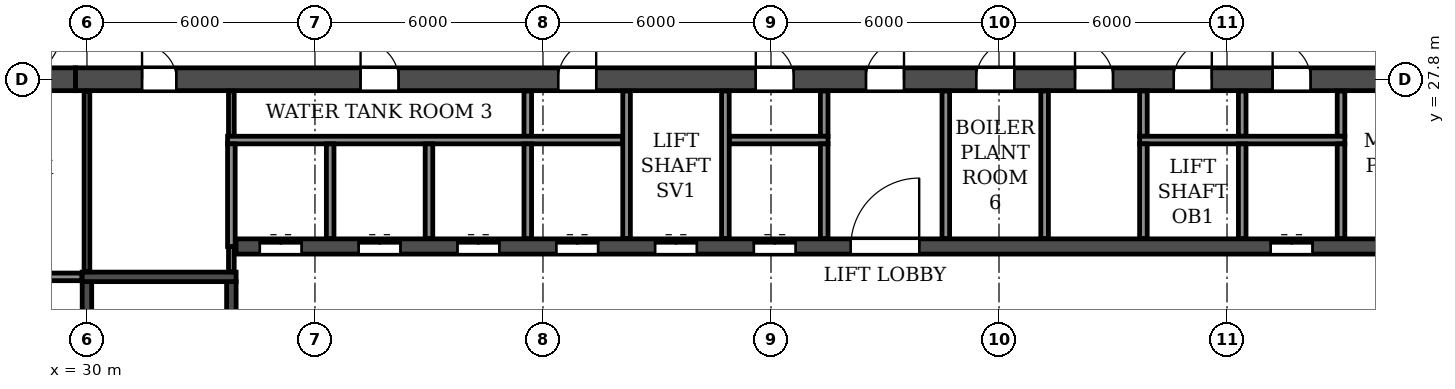
"""IFC4 building model, lengths in metres.
Left out: names, types, materials, properties, quantities, classifications, styles, units other than length and angle.
Written with IfcOpenShell. Run it as: python <this file> out.ifc"""

import sys

from ifc_helpers import new_model, si_unit, direction, frame, frame_2d, origin, place, context, subcontext, project, spatial, rectangle, extrude, element, fill, save


model = new_model("IFC4")
c1 = context("Model", 3, precision=1e-05, world=origin(), true_north=direction((0.0, 1.0)))
c2 = subcontext(c1, "Body", "Model", "MODEL_VIEW")
j1 = project(units=[si_unit("LENGTHUNIT", "METRE"), si_unit("PLANEANGLEUNIT", "RADIAN")], contexts=[c1])
p1 = place(None, origin())
s1 = spatial("IfcSite", under=j1, at=p1, CompositionType="ELEMENT")
p2 = place(p1, origin())
s2 = spatial("IfcBuilding", under=s1, at=p2, CompositionType="ELEMENT")
p3 = place(p2, frame((0.0, 0.0, 214.8)))
s3 = spatial("IfcBuildingStorey", under=s2, at=p3, CompositionType="ELEMENT", Elevation=214.8)
p4 = place(p3, frame((24.9, 27.8, 0.0), z_axis=(0.0, 0.0, 1.0), x_axis=(1.0, 0.0, 0.0)))
e1 = element("IfcWall", 1, at=p4, inside=s3, PredefinedType="SHEAR", context=c2, shape_type="SweptSolid", body=[
    extrude(rectangle(XDim=4.8, YDim=0.6, at=frame_2d((2.4, 0.0))), origin(), (0.0, 0.0, 1.0), 6.38),
])
p5 = place(p4, frame((1.9, 0.0, 0.0)))
e2 = element("IfcOpeningElement", 2, at=p5, cuts=e1, PredefinedType="OPENING", context=c2, shape_type="SweptSolid", body=[
    extrude(rectangle(XDim=1.0, YDim=2.1, at=frame_2d((0.5, 1.05))), frame((0.0, 0.31, 0.0), z_axis=(0.0, -1.0, 0.0), x_axis=(1.0, 0.0, 0.0)), (0.0, 0.0, 1.0), 0.62),
])
p6 = place(p3, frame((29.7, 27.8, 0.0), z_axis=(0.0, 0.0, 1.0), x_axis=(1.0, 0.0, 0.0)))
e3 = element("IfcWall", 3, at=p6, inside=s3, PredefinedType="SOLIDWALL", context=c2, shape_type="SweptSolid", body=[
    extrude(rectangle(XDim=42.6, YDim=0.6, at=frame_2d((21.3, 0.0))), origin(), (0.0, 0.0, 1.0), 6.38),
])
p7 = place(p6, frame((1.75, 0.0, 0.0)))
e4 = element("IfcOpeningElement", 4, at=p7, cuts=e3, PredefinedType="OPENING", context=c2, shape_type="SweptSolid", body=[
    extrude(rectangle(XDim=0.9, YDim=2.1, at=frame_2d((0.45, 1.05))), frame((0.0, 0.31, 0.0), z_axis=(0.0, -1.0, 0.0), x_axis=(1.0, 0.0, 0.0)), (0.0, 0.0, 1.0), 0.62),
])
p8 = place(p6, frame((7.5, 0.0, 0.0)))
e5 = element("IfcOpeningElement", 5, at=p8, cuts=e3, PredefinedType="OPENING", context=c2, shape_type="SweptSolid", body=[
    extrude(rectangle(XDim=1.0, YDim=2.1, at=frame_2d((0.5, 1.05))), frame((0.0, 0.31, 0.0), z_axis=(0.0, -1.0, 0.0), x_axis=(1.0, 0.0, 0.0)), (0.0, 0.0, 1.0), 0.62),
])
p9 = place(p6, frame((12.7, 0.0, 0.0)))
e6 = element("IfcOpeningElement", 6, at=p9, cuts=e3, PredefinedType="OPENING", context=c2, shape_type="SweptSolid", body=[
    extrude(rectangle(XDim=1.0, YDim=2.1, at=frame_2d((0.5, 1.05))), frame((0.0, 0.31, 0.0), z_axis=(0.0, -1.0, 0.0), x_axis=(1.0, 0.0, 0.0)), (0.0, 0.0, 1.0), 0.62),
])
p10 = place(p6, frame((17.9, 0.0, 0.0)))
e7 = element("IfcOpeningElement", 7, at=p10, cuts=e3, PredefinedType="OPENING", context=c2, shape_type="SweptSolid", body=[
    extrude(rectangle(XDim=1.0, YDim=2.1, at=frame_2d((0.5, 1.05))), frame((0.0, 0.31, 0.0), z_axis=(0.0, -1.0, 0.0), x_axis=(1.0, 0.0, 0.0)), (0.0, 0.0, 1.0), 0.62),
])
p11 = place(p6, frame((20.8, 0.0, 0.0)))
e8 = element("IfcOpeningElement", 8, at=p11, cuts=e3, PredefinedType="OPENING", context=c2, shape_type="SweptSolid", body=[
    extrude(rectangle(XDim=1.0, YDim=2.1, at=frame_2d((0.5, 1.05))), frame((0.0, 0.31, 0.0), z_axis=(0.0, -1.0, 0.0), x_axis=(1.0, 0.0, 0.0)), (0.0, 0.0, 1.0), 0.62),
])
p12 = place(p6, frame((23.7, 0.0, 0.0)))
e9 = element("IfcOpeningElement", 9, at=p12, cuts=e3, PredefinedType="OPENING", context=c2, shape_type="SweptSolid", body=[
    extrude(rectangle(XDim=1.0, YDim=2.1, at=frame_2d((0.5, 1.05))), frame((0.0, 0.31, 0.0), z_axis=(0.0, -1.0, 0.0), x_axis=(1.0, 0.0, 0.0)), (0.0, 0.0, 1.0), 0.62),
])
p13 = place(p6, frame((26.3, 0.0, 0.0)))
e10 = element("IfcOpeningElement", 10, at=p13, cuts=e3, PredefinedType="OPENING", context=c2, shape_type="SweptSolid", body=[
    extrude(rectangle(XDim=1.0, YDim=2.1, at=frame_2d((0.5, 1.05))), frame((0.0, 0.31, 0.0), z_axis=(0.0, -1.0, 0.0), x_axis=(1.0, 0.0, 0.0)), (0.0, 0.0, 1.0), 0.62),
])
p14 = place(p6, frame((28.9, 0.0, 0.0)))
e11 = element("IfcOpeningElement", 11, at=p14, cuts=e3, PredefinedType="OPENING", context=c2, shape_type="SweptSolid", body=[
    extrude(rectangle(XDim=1.0, YDim=2.1, at=frame_2d((0.5, 1.05))), frame((0.0, 0.31, 0.0), z_axis=(0.0, -1.0, 0.0), x_axis=(1.0, 0.0, 0.0)), (0.0, 0.0, 1.0), 0.62),
])
p15 = place(p6, frame((31.5, 0.0, 0.0)))
e12 = element("IfcOpeningElement", 12, at=p15, cuts=e3, PredefinedType="OPENING", context=c2, shape_type="SweptSolid", body=[
    extrude(rectangle(XDim=1.0, YDim=2.1, at=frame_2d((0.5, 1.05))), frame((0.0, 0.31, 0.0), z_axis=(0.0, -1.0, 0.0), x_axis=(1.0, 0.0, 0.0)), (0.0, 0.0, 1.0), 0.62),
])
p16 = place(p6, frame((35.4, 0.0, 0.0)))
e13 = element("IfcOpeningElement", 13, at=p16, cuts=e3, PredefinedType="OPENING", context=c2, shape_type="SweptSolid", body=[
    extrude(rectangle(XDim=1.0, YDim=2.1, at=frame_2d((0.5, 1.05))), frame((0.0, 0.31, 0.0), z_axis=(0.0, -1.0, 0.0), x_axis=(1.0, 0.0, 0.0)), (0.0, 0.0, 1.0), 0.62),
])
p17 = place(p6, frame((39.95, 0.0, 0.0)))
e14 = element("IfcOpeningElement", 14, at=p17, cuts=e3, PredefinedType="OPENING", context=c2, shape_type="SweptSolid", body=[
    extrude(rectangle(XDim=0.9, YDim=2.1, at=frame_2d((0.45, 1.05))), frame((0.0, 0.31, 0.0), z_axis=(0.0, -1.0, 0.0), x_axis=(1.0, 0.0, 0.0)), (0.0, 0.0, 1.0), 0.62),
])
p18 = place(p3, frame((33.925, 23.4, 0.0), z_axis=(0.0, 0.0, 1.0), x_axis=(1.0, 0.0, 0.0)))
e15 = element("IfcWall", 15, at=p18, inside=s3, PredefinedType="SOLIDWALL", context=c2, shape_type="SweptSolid", body=[
    extrude(rectangle(XDim=34.15, YDim=0.4, at=frame_2d((17.075, 0.0))), origin(), (0.0, 0.0, 1.0), 6.38),
])
p19 = place(p18, frame((16.175, 0.0, 0.0)))
e16 = element("IfcOpeningElement", 16, at=p19, cuts=e15, PredefinedType="OPENING", context=c2, shape_type="SweptSolid", body=[
    extrude(rectangle(XDim=1.8, YDim=2.1, at=frame_2d((0.9, 1.05))), frame((0.0, 0.21, 0.0), z_axis=(0.0, -1.0, 0.0), x_axis=(1.0, 0.0, 0.0)), (0.0, 0.0, 1.0), 0.42),
])
p20 = place(p18, frame((0.625, 0.0, 0.0)))
e17 = element("IfcOpeningElement", 17, at=p20, cuts=e15, PredefinedType="OPENING", context=c2, shape_type="SweptSolid", body=[
    extrude(rectangle(XDim=1.1, YDim=2.1, at=frame_2d((0.55, 1.05))), frame((0.0, 0.21, 0.0), z_axis=(0.0, -1.0, 0.0), x_axis=(1.0, 0.0, 0.0)), (0.0, 0.0, 1.0), 0.42),
])
p21 = place(p18, frame((3.225, 0.0, 0.0)))
e18 = element("IfcOpeningElement", 18, at=p21, cuts=e15, PredefinedType="OPENING", context=c2, shape_type="SweptSolid", body=[
    extrude(rectangle(XDim=1.1, YDim=2.1, at=frame_2d((0.55, 1.05))), frame((0.0, 0.21, 0.0), z_axis=(0.0, -1.0, 0.0), x_axis=(1.0, 0.0, 0.0)), (0.0, 0.0, 1.0), 0.42),
])
p22 = place(p18, frame((5.825, 0.0, 0.0)))
e19 = element("IfcOpeningElement", 19, at=p22, cuts=e15, PredefinedType="OPENING", context=c2, shape_type="SweptSolid", body=[
    extrude(rectangle(XDim=1.1, YDim=2.1, at=frame_2d((0.55, 1.05))), frame((0.0, 0.21, 0.0), z_axis=(0.0, -1.0, 0.0), x_axis=(1.0, 0.0, 0.0)), (0.0, 0.0, 1.0), 0.42),
])
p23 = place(p18, frame((8.425, 0.0, 0.0)))
e20 = element("IfcOpeningElement", 20, at=p23, cuts=e15, PredefinedType="OPENING", context=c2, shape_type="SweptSolid", body=[
    extrude(rectangle(XDim=1.1, YDim=2.1, at=frame_2d((0.55, 1.05))), frame((0.0, 0.21, 0.0), z_axis=(0.0, -1.0, 0.0), x_axis=(1.0, 0.0, 0.0)), (0.0, 0.0, 1.0), 0.42),
])
p24 = place(p18, frame((11.025, 0.0, 0.0)))
e21 = element("IfcOpeningElement", 21, at=p24, cuts=e15, PredefinedType="OPENING", context=c2, shape_type="SweptSolid", body=[
    extrude(rectangle(XDim=1.1, YDim=2.1, at=frame_2d((0.55, 1.05))), frame((0.0, 0.21, 0.0), z_axis=(0.0, -1.0, 0.0), x_axis=(1.0, 0.0, 0.0)), (0.0, 0.0, 1.0), 0.42),
])
p25 = place(p18, frame((13.625, 0.0, 0.0)))
e22 = element("IfcOpeningElement", 22, at=p25, cuts=e15, PredefinedType="OPENING", context=c2, shape_type="SweptSolid", body=[
    extrude(rectangle(XDim=1.1, YDim=2.1, at=frame_2d((0.55, 1.05))), frame((0.0, 0.21, 0.0), z_axis=(0.0, -1.0, 0.0), x_axis=(1.0, 0.0, 0.0)), (0.0, 0.0, 1.0), 0.42),
])
p26 = place(p18, frame((27.225, 0.0, 0.0)))
e23 = element("IfcOpeningElement", 23, at=p26, cuts=e15, PredefinedType="OPENING", context=c2, shape_type="SweptSolid", body=[
    extrude(rectangle(XDim=1.1, YDim=2.1, at=frame_2d((0.55, 1.05))), frame((0.0, 0.21, 0.0), z_axis=(0.0, -1.0, 0.0), x_axis=(1.0, 0.0, 0.0)), (0.0, 0.0, 1.0), 0.42),
])
p27 = place(p3, frame((30.0, 14.8, 0.0), z_axis=(0.0, 0.0, 1.0), x_axis=(0.0, 1.0, 0.0)))
e24 = element("IfcWall", 24, at=p27, inside=s3, PredefinedType="SOLIDWALL", context=c2, shape_type="SweptSolid", body=[
    extrude(rectangle(XDim=7.675, YDim=0.25, at=frame_2d((3.837, 0.0))), origin(), (0.0, 0.0, 1.0), 6.38),
])
p28 = place(p3, frame((33.8, 14.8, 0.0), z_axis=(0.0, 0.0, 1.0), x_axis=(0.0, 1.0, 0.0)))
e25 = element("IfcWall", 25, at=p28, inside=s3, PredefinedType="SOLIDWALL", context=c2, shape_type="SweptSolid", body=[
    extrude(rectangle(XDim=7.675, YDim=0.25, at=frame_2d((3.837, 0.0))), origin(), (0.0, 0.0, 1.0), 6.38),
])
p29 = place(p28, frame((0.5, 0.0, 0.0)))
e26 = element("IfcOpeningElement", 26, at=p29, cuts=e25, PredefinedType="OPENING", context=c2, shape_type="SweptSolid", body=[
    extrude(rectangle(XDim=1.0, YDim=2.1, at=frame_2d((0.5, 1.05))), frame((0.0, 0.135, 0.0), z_axis=(0.0, -1.0, 0.0), x_axis=(1.0, 0.0, 0.0)), (0.0, 0.0, 1.0), 0.27),
])
p30 = place(p3, frame((29.875, 22.6, 0.0), z_axis=(0.0, 0.0, 1.0), x_axis=(1.0, 0.0, 0.0)))
e27 = element("IfcWall", 27, at=p30, inside=s3, PredefinedType="SOLIDWALL", context=c2, shape_type="SweptSolid", body=[
    extrude(rectangle(XDim=4.05, YDim=0.25, at=frame_2d((2.025, 0.0))), origin(), (0.0, 0.0, 1.0), 6.38),
])
for number, where, z_axis, x_axis in (
    (28, (41.6, 26.3, 0.0), (0.0, 0.0, 1.0), (0.0, 1.0, 0.0)),
    (29, (49.4, 26.3, 0.0), (0.0, 0.0, 1.0), (0.0, 1.0, 0.0)),
):
    element("IfcWall", number, at=place(p3, frame(where, z_axis=z_axis, x_axis=x_axis)), inside=s3, PredefinedType="PARTITIONING", context=c2, shape_type="SweptSolid", body=[
        extrude(rectangle(XDim=1.19, YDim=0.2, at=frame_2d((0.595, 0.0))), origin(), (0.0, 0.0, 1.0), 6.38),
    ])
for number, where, z_axis, x_axis in (
    (30, (52.6, 23.61, 0.0), (0.0, 0.0, 1.0), (0.0, 1.0, 0.0)),
    (31, (55.2, 23.61, 0.0), (0.0, 0.0, 1.0), (0.0, 1.0, 0.0)),
):
    element("IfcWall", number, at=place(p3, frame(where, z_axis=z_axis, x_axis=x_axis)), inside=s3, PredefinedType="PARTITIONING", context=c2, shape_type="SweptSolid", body=[
        extrude(rectangle(XDim=3.88, YDim=0.2, at=frame_2d((1.94, 0.0))), origin(), (0.0, 0.0, 1.0), 6.38),
    ])
for number, where, z_axis, x_axis in (
    (32, (57.8, 26.3, 0.0), (0.0, 0.0, 1.0), (0.0, 1.0, 0.0)),
    (33, (60.4, 26.3, 0.0), (0.0, 0.0, 1.0), (0.0, 1.0, 0.0)),
    (34, (63.0, 26.3, 0.0), (0.0, 0.0, 1.0), (0.0, 1.0, 0.0)),
):
    element("IfcWall", number, at=place(p3, frame(where, z_axis=z_axis, x_axis=x_axis)), inside=s3, PredefinedType="PARTITIONING", context=c2, shape_type="SweptSolid", body=[
        extrude(rectangle(XDim=1.19, YDim=0.2, at=frame_2d((0.595, 0.0))), origin(), (0.0, 0.0, 1.0), 6.38),
    ])
p31 = place(p3, frame((24.735, 22.6, 0.0), z_axis=(0.0, 0.0, 1.0), x_axis=(1.0, 0.0, 0.0)))
e35 = element("IfcWall", 35, at=p31, inside=s3, PredefinedType="PARTITIONING", context=c2, shape_type="SweptSolid", body=[
    extrude(rectangle(XDim=5.13, YDim=0.2, at=frame_2d((2.565, 0.0))), origin(), (0.0, 0.0, 1.0), 6.38),
])
p32 = place(p3, frame((30.0, 22.735, 0.0), z_axis=(0.0, 0.0, 1.0), x_axis=(0.0, 1.0, 0.0)))
e36 = element("IfcWall", 36, at=p32, inside=s3, PredefinedType="PARTITIONING", context=c2, shape_type="SweptSolid", body=[
    extrude(rectangle(XDim=4.755, YDim=0.15, at=frame_2d((2.377, 0.0))), origin(), (0.0, 0.0, 1.0), 6.38),
])
p33 = place(p3, frame((33.8, 22.735, 0.0), z_axis=(0.0, 0.0, 1.0), x_axis=(0.0, 1.0, 0.0)))
e37 = element("IfcWall", 37, at=p33, inside=s3, PredefinedType="PARTITIONING", context=c2, shape_type="SweptSolid", body=[
    extrude(rectangle(XDim=0.665, YDim=0.15, at=frame_2d((0.333, 0.0))), origin(), (0.0, 0.0, 1.0), 6.38),
])
p34 = place(p3, frame((33.8, 26.3, 0.0), z_axis=(0.0, 0.0, 1.0), x_axis=(0.0, 1.0, 0.0)))
e38 = element("IfcWall", 38, at=p34, inside=s3, PredefinedType="PARTITIONING", context=c2, shape_type="SweptSolid", body=[
    extrude(rectangle(XDim=1.19, YDim=0.15, at=frame_2d((0.595, 0.0))), origin(), (0.0, 0.0, 1.0), 6.38),
])
p35 = place(p3, frame((33.7, 26.2, 0.0), z_axis=(0.0, 0.0, 1.0), x_axis=(1.0, 0.0, 0.0)))
e39 = element("IfcWall", 39, at=p35, inside=s3, PredefinedType="PARTITIONING", context=c2, shape_type="SweptSolid", body=[
    extrude(rectangle(XDim=10.4, YDim=0.2, at=frame_2d((5.2, 0.0))), origin(), (0.0, 0.0, 1.0), 6.38),
])
p36 = place(p3, frame((46.9, 26.2, 0.0), z_axis=(0.0, 0.0, 1.0), x_axis=(1.0, 0.0, 0.0)))
e40 = element("IfcWall", 40, at=p36, inside=s3, PredefinedType="PARTITIONING", context=c2, shape_type="SweptSolid", body=[
    extrude(rectangle(XDim=2.6, YDim=0.2, at=frame_2d((1.3, 0.0))), origin(), (0.0, 0.0, 1.0), 6.38),
])
p37 = place(p3, frame((57.7, 26.2, 0.0), z_axis=(0.0, 0.0, 1.0), x_axis=(1.0, 0.0, 0.0)))
e41 = element("IfcWall", 41, at=p37, inside=s3, PredefinedType="PARTITIONING", context=c2, shape_type="SweptSolid", body=[
    extrude(rectangle(XDim=5.4, YDim=0.2, at=frame_2d((2.7, 0.0))), origin(), (0.0, 0.0, 1.0), 6.38),
])
p38 = place(p3, frame((33.8, 23.4, 0.0), z_axis=(0.0, 0.0, 1.0), x_axis=(0.0, 1.0, 0.0)))
e42 = element("IfcWall", 42, at=p38, inside=s3, PredefinedType="PARTITIONING", context=c2, shape_type="SweptSolid", body=[
    extrude(rectangle(XDim=2.7, YDim=0.2, at=frame_2d((1.35, 0.0))), origin(), (0.0, 0.0, 1.0), 6.38),
])
for number, where, z_axis, x_axis in (
    (43, (36.4, 23.61, 0.0), (0.0, 0.0, 1.0), (0.0, 1.0, 0.0)),
    (44, (39.0, 23.61, 0.0), (0.0, 0.0, 1.0), (0.0, 1.0, 0.0)),
    (45, (41.6, 23.61, 0.0), (0.0, 0.0, 1.0), (0.0, 1.0, 0.0)),
):
    element("IfcWall", number, at=place(p3, frame(where, z_axis=z_axis, x_axis=x_axis)), inside=s3, PredefinedType="PARTITIONING", context=c2, shape_type="SweptSolid", body=[
        extrude(rectangle(XDim=2.49, YDim=0.2, at=frame_2d((1.245, 0.0))), origin(), (0.0, 0.0, 1.0), 6.38),
    ])
for number, where, z_axis, x_axis in (
    (46, (44.2, 23.61, 0.0), (0.0, 0.0, 1.0), (0.0, 1.0, 0.0)),
    (47, (46.8, 23.61, 0.0), (0.0, 0.0, 1.0), (0.0, 1.0, 0.0)),
):
    element("IfcWall", number, at=place(p3, frame(where, z_axis=z_axis, x_axis=x_axis)), inside=s3, PredefinedType="PARTITIONING", context=c2, shape_type="SweptSolid", body=[
        extrude(rectangle(XDim=3.88, YDim=0.2, at=frame_2d((1.94, 0.0))), origin(), (0.0, 0.0, 1.0), 6.38),
    ])
for number, where, z_axis, x_axis in (
    (48, (49.4, 23.61, 0.0), (0.0, 0.0, 1.0), (0.0, 1.0, 0.0)),
    (49, (57.8, 23.61, 0.0), (0.0, 0.0, 1.0), (0.0, 1.0, 0.0)),
    (50, (60.4, 23.61, 0.0), (0.0, 0.0, 1.0), (0.0, 1.0, 0.0)),
    (51, (63.0, 23.61, 0.0), (0.0, 0.0, 1.0), (0.0, 1.0, 0.0)),
):
    element("IfcWall", number, at=place(p3, frame(where, z_axis=z_axis, x_axis=x_axis)), inside=s3, PredefinedType="PARTITIONING", context=c2, shape_type="SweptSolid", body=[
        extrude(rectangle(XDim=2.49, YDim=0.2, at=frame_2d((1.245, 0.0))), origin(), (0.0, 0.0, 1.0), 6.38),
    ])
p39 = place(p7, origin())
e52 = element("IfcDoor", 52, at=p39, inside=s3, OperationType="SINGLE_SWING_LEFT", PredefinedType="DOOR", context=c2, shape_type="SweptSolid", body=[
    extrude(rectangle(XDim=0.9, YDim=2.1, at=frame_2d((0.45, 1.05))), frame((0.0, 0.025, 0.0), z_axis=(0.0, -1.0, 0.0), x_axis=(1.0, 0.0, 0.0)), (0.0, 0.0, 1.0), 0.05),
])
fill(e4, e52)
p40 = place(p8, origin())
e53 = element("IfcDoor", 53, at=p40, inside=s3, OperationType="SINGLE_SWING_LEFT", PredefinedType="DOOR", context=c2, shape_type="SweptSolid", body=[
    extrude(rectangle(XDim=1.0, YDim=2.1, at=frame_2d((0.5, 1.05))), frame((0.0, 0.025, 0.0), z_axis=(0.0, -1.0, 0.0), x_axis=(1.0, 0.0, 0.0)), (0.0, 0.0, 1.0), 0.05),
])
fill(e5, e53)
p41 = place(p9, origin())
e54 = element("IfcDoor", 54, at=p41, inside=s3, OperationType="SINGLE_SWING_RIGHT", PredefinedType="DOOR", context=c2, shape_type="SweptSolid", body=[
    extrude(rectangle(XDim=1.0, YDim=2.1, at=frame_2d((0.5, 1.05))), frame((0.0, 0.025, 0.0), z_axis=(0.0, -1.0, 0.0), x_axis=(1.0, 0.0, 0.0)), (0.0, 0.0, 1.0), 0.05),
])
fill(e6, e54)
p42 = place(p10, origin())
e55 = element("IfcDoor", 55, at=p42, inside=s3, OperationType="SINGLE_SWING_LEFT", PredefinedType="DOOR", context=c2, shape_type="SweptSolid", body=[
    extrude(rectangle(XDim=1.0, YDim=2.1, at=frame_2d((0.5, 1.05))), frame((0.0, 0.025, 0.0), z_axis=(0.0, -1.0, 0.0), x_axis=(1.0, 0.0, 0.0)), (0.0, 0.0, 1.0), 0.05),
])
fill(e7, e55)
p43 = place(p11, origin())
e56 = element("IfcDoor", 56, at=p43, inside=s3, OperationType="SINGLE_SWING_RIGHT", PredefinedType="DOOR", context=c2, shape_type="SweptSolid", body=[
    extrude(rectangle(XDim=1.0, YDim=2.1, at=frame_2d((0.5, 1.05))), frame((0.0, 0.025, 0.0), z_axis=(0.0, -1.0, 0.0), x_axis=(1.0, 0.0, 0.0)), (0.0, 0.0, 1.0), 0.05),
])
fill(e8, e56)
p44 = place(p12, origin())
e57 = element("IfcDoor", 57, at=p44, inside=s3, OperationType="SINGLE_SWING_RIGHT", PredefinedType="DOOR", context=c2, shape_type="SweptSolid", body=[
    extrude(rectangle(XDim=1.0, YDim=2.1, at=frame_2d((0.5, 1.05))), frame((0.0, 0.025, 0.0), z_axis=(0.0, -1.0, 0.0), x_axis=(1.0, 0.0, 0.0)), (0.0, 0.0, 1.0), 0.05),
])
fill(e9, e57)
p45 = place(p13, origin())
e58 = element("IfcDoor", 58, at=p45, inside=s3, OperationType="SINGLE_SWING_LEFT", PredefinedType="DOOR", context=c2, shape_type="SweptSolid", body=[
    extrude(rectangle(XDim=1.0, YDim=2.1, at=frame_2d((0.5, 1.05))), frame((0.0, 0.025, 0.0), z_axis=(0.0, -1.0, 0.0), x_axis=(1.0, 0.0, 0.0)), (0.0, 0.0, 1.0), 0.05),
])
fill(e10, e58)
p46 = place(p14, origin())
e59 = element("IfcDoor", 59, at=p46, inside=s3, OperationType="SINGLE_SWING_RIGHT", PredefinedType="DOOR", context=c2, shape_type="SweptSolid", body=[
    extrude(rectangle(XDim=1.0, YDim=2.1, at=frame_2d((0.5, 1.05))), frame((0.0, 0.025, 0.0), z_axis=(0.0, -1.0, 0.0), x_axis=(1.0, 0.0, 0.0)), (0.0, 0.0, 1.0), 0.05),
])
fill(e11, e59)
p47 = place(p15, origin())
e60 = element("IfcDoor", 60, at=p47, inside=s3, OperationType="SINGLE_SWING_LEFT", PredefinedType="DOOR", context=c2, shape_type="SweptSolid", body=[
    extrude(rectangle(XDim=1.0, YDim=2.1, at=frame_2d((0.5, 1.05))), frame((0.0, 0.025, 0.0), z_axis=(0.0, -1.0, 0.0), x_axis=(1.0, 0.0, 0.0)), (0.0, 0.0, 1.0), 0.05),
])
fill(e12, e60)
p48 = place(p19, origin())
e61 = element("IfcDoor", 61, at=p48, inside=s3, OperationType="DOUBLE_DOOR_SINGLE_SWING", PredefinedType="DOOR", context=c2, shape_type="SweptSolid", body=[
    extrude(rectangle(XDim=1.8, YDim=2.1, at=frame_2d((0.9, 1.05))), frame((0.0, 0.025, 0.0), z_axis=(0.0, -1.0, 0.0), x_axis=(1.0, 0.0, 0.0)), (0.0, 0.0, 1.0), 0.05),
])
fill(e16, e61)
p49 = place(p20, origin())
e62 = element("IfcDoor", 62, at=p49, inside=s3, OperationType="DOUBLE_DOOR_SLIDING", PredefinedType="DOOR", context=c2, shape_type="SweptSolid", body=[
    extrude(rectangle(XDim=1.1, YDim=2.1, at=frame_2d((0.55, 1.05))), frame((0.0, 0.025, 0.0), z_axis=(0.0, -1.0, 0.0), x_axis=(1.0, 0.0, 0.0)), (0.0, 0.0, 1.0), 0.05),
])
fill(e17, e62)
p50 = place(p21, origin())
e63 = element("IfcDoor", 63, at=p50, inside=s3, OperationType="DOUBLE_DOOR_SLIDING", PredefinedType="DOOR", context=c2, shape_type="SweptSolid", body=[
    extrude(rectangle(XDim=1.1, YDim=2.1, at=frame_2d((0.55, 1.05))), frame((0.0, 0.025, 0.0), z_axis=(0.0, -1.0, 0.0), x_axis=(1.0, 0.0, 0.0)), (0.0, 0.0, 1.0), 0.05),
])
fill(e18, e63)
p51 = place(p22, origin())
e64 = element("IfcDoor", 64, at=p51, inside=s3, OperationType="DOUBLE_DOOR_SLIDING", PredefinedType="DOOR", context=c2, shape_type="SweptSolid", body=[
    extrude(rectangle(XDim=1.1, YDim=2.1, at=frame_2d((0.55, 1.05))), frame((0.0, 0.025, 0.0), z_axis=(0.0, -1.0, 0.0), x_axis=(1.0, 0.0, 0.0)), (0.0, 0.0, 1.0), 0.05),
])
fill(e19, e64)
p52 = place(p23, origin())
e65 = element("IfcDoor", 65, at=p52, inside=s3, OperationType="DOUBLE_DOOR_SLIDING", PredefinedType="DOOR", context=c2, shape_type="SweptSolid", body=[
    extrude(rectangle(XDim=1.1, YDim=2.1, at=frame_2d((0.55, 1.05))), frame((0.0, 0.025, 0.0), z_axis=(0.0, -1.0, 0.0), x_axis=(1.0, 0.0, 0.0)), (0.0, 0.0, 1.0), 0.05),
])
fill(e20, e65)
p53 = place(p24, origin())
e66 = element("IfcDoor", 66, at=p53, inside=s3, OperationType="DOUBLE_DOOR_SLIDING", PredefinedType="DOOR", context=c2, shape_type="SweptSolid", body=[
    extrude(rectangle(XDim=1.1, YDim=2.1, at=frame_2d((0.55, 1.05))), frame((0.0, 0.025, 0.0), z_axis=(0.0, -1.0, 0.0), x_axis=(1.0, 0.0, 0.0)), (0.0, 0.0, 1.0), 0.05),
])
fill(e21, e66)
p54 = place(p25, origin())
e67 = element("IfcDoor", 67, at=p54, inside=s3, OperationType="DOUBLE_DOOR_SLIDING", PredefinedType="DOOR", context=c2, shape_type="SweptSolid", body=[
    extrude(rectangle(XDim=1.1, YDim=2.1, at=frame_2d((0.55, 1.05))), frame((0.0, 0.025, 0.0), z_axis=(0.0, -1.0, 0.0), x_axis=(1.0, 0.0, 0.0)), (0.0, 0.0, 1.0), 0.05),
])
fill(e22, e67)
p55 = place(p26, origin())
e68 = element("IfcDoor", 68, at=p55, inside=s3, OperationType="DOUBLE_DOOR_SLIDING", PredefinedType="DOOR", context=c2, shape_type="SweptSolid", body=[
    extrude(rectangle(XDim=1.1, YDim=2.1, at=frame_2d((0.55, 1.05))), frame((0.0, 0.025, 0.0), z_axis=(0.0, -1.0, 0.0), x_axis=(1.0, 0.0, 0.0)), (0.0, 0.0, 1.0), 0.05),
])
fill(e23, e68)
save(model, sys.argv[1])
